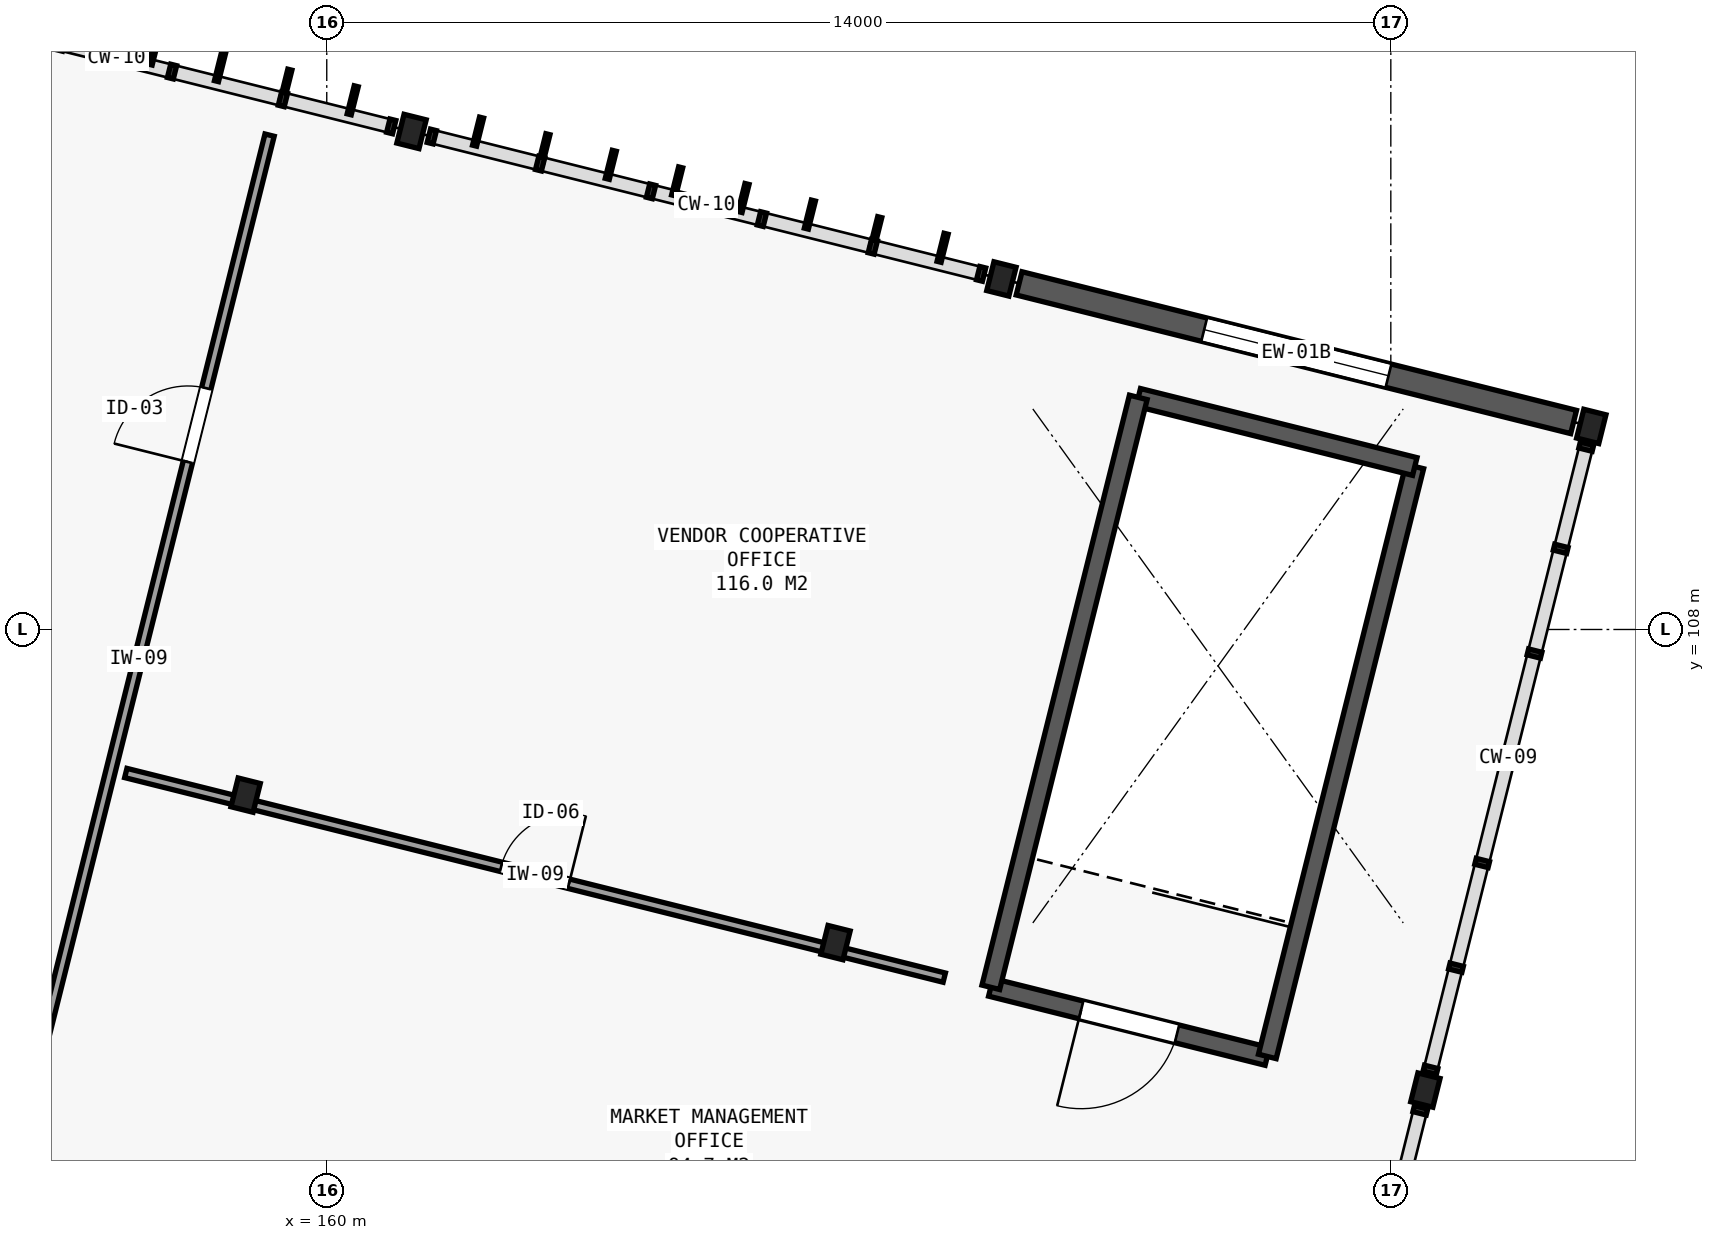
"""IFC4 building model, lengths in metres.
Left out: names, types, materials, properties, quantities, classifications, styles, units other than length and angle.
Written with IfcOpenShell. Run it as: python <this file> out.ifc"""

import sys

from ifc_helpers import new_model, si_unit, direction, frame, frame_2d, origin, origin_2d, place, context, subcontext, project, spatial, rectangle, i_section, extrude, element, fill, save


model = new_model("IFC4")
c1 = context("Model", 3, precision=1e-05, world=origin(), true_north=direction((0.0, 1.0)))
c2 = subcontext(c1, "Body", "Model", "MODEL_VIEW")
j1 = project(units=[si_unit("LENGTHUNIT", "METRE"), si_unit("PLANEANGLEUNIT", "RADIAN")], contexts=[c1])
p1 = place(None, origin())
s1 = spatial("IfcSite", under=j1, at=p1, CompositionType="ELEMENT")
p2 = place(p1, origin())
s2 = spatial("IfcBuilding", under=s1, at=p2, CompositionType="ELEMENT")
p3 = place(p2, frame((0.0, 0.0, 14.1)))
s3 = spatial("IfcBuildingStorey", under=s2, at=p3, CompositionType="ELEMENT", Elevation=14.1)
for number, where, z_axis, x_axis in (
    (1, (158.932, 105.821, 0.0), (0.0, 0.0, 1.0), (0.97, -0.243, 0.0)),
    (2, (161.115, 114.552, 0.0), (0.0, 0.0, 1.0), (0.97, -0.243, 0.0)),
    (3, (166.694, 103.881, 0.0), (0.0, 0.0, 1.0), (0.97, -0.243, 0.0)),
    (4, (168.876, 112.612, 0.0), (0.0, 0.0, 1.0), (0.97, -0.243, 0.0)),
    (5, (174.455, 101.94, 0.0), (0.0, 0.0, 1.0), (0.97, -0.243, 0.0)),
    (6, (176.638, 110.672, 0.0), (0.0, 0.0, 1.0), (0.97, -0.243, 0.0)),
):
    element("IfcColumn", number, at=place(p3, frame(where, z_axis=z_axis, x_axis=x_axis)), inside=s3, PredefinedType="COLUMN", context=c2, shape_type="SweptSolid", body=[
        extrude(i_section(OverallWidth=0.3, OverallDepth=0.39, WebThickness=0.011, FlangeThickness=0.019, FilletRadius=0.027, at=origin_2d()), origin(), (0.0, 0.0, 1.0), 4.2),
    ])
p4 = place(p3, frame((169.109, 112.554, 0.0), z_axis=(0.0, 0.0, 1.0), x_axis=(0.970138680536, -0.242550902961, 0.0)))
e7 = element("IfcWall", 7, at=p4, inside=s3, PredefinedType="SHEAR", context=c2, shape_type="SweptSolid", body=[
    extrude(rectangle(XDim=7.52, YDim=0.315, at=frame_2d((3.76, 0.0))), origin(), (0.0, 0.0, 1.0), 3.96),
])
p5 = place(p4, frame((2.51, 0.0, 1.0)))
e8 = element("IfcOpeningElement", 8, at=p5, cuts=e7, PredefinedType="OPENING", context=c2, shape_type="SweptSolid", body=[
    extrude(rectangle(XDim=2.5, YDim=1.65, at=frame_2d((1.25, 0.825))), frame((0.0, 0.167, 0.0), z_axis=(0.0, -1.0, 0.0), x_axis=(1.0, 0.0, 0.0)), (0.0, 0.0, 1.0), 0.335),
])
p6 = place(p3, frame((172.375, 102.383, 0.0), z_axis=(0.0, 0.0, 1.0), x_axis=(-0.970131009923, 0.242581581301, 0.0)))
e9 = element("IfcWall", 9, at=p6, inside=s3, PredefinedType="SOLIDWALL", context=c2, shape_type="SweptSolid", body=[
    extrude(rectangle(XDim=3.75, YDim=0.24, at=frame_2d((1.875, 0.0))), origin(), (0.0, 0.0, 1.0), 3.96),
])
p7 = place(p6, frame((1.225, 0.0, 0.0)))
e10 = element("IfcOpeningElement", 10, at=p7, cuts=e9, PredefinedType="OPENING", context=c2, shape_type="SweptSolid", body=[
    extrude(rectangle(XDim=1.3, YDim=2.15, at=frame_2d((0.65, 1.075))), frame((0.0, 0.13, 0.0), z_axis=(0.0, -1.0, 0.0), x_axis=(1.0, 0.0, 0.0)), (0.0, 0.0, 1.0), 0.26),
])
p8 = place(p3, frame((174.315, 110.144, 0.0), z_axis=(0.0, 0.0, 1.0), x_axis=(-0.242521263911, -0.970146090314, 0.0)))
e11 = element("IfcWall", 11, at=p8, inside=s3, PredefinedType="SOLIDWALL", context=c2, shape_type="SweptSolid", body=[
    extrude(rectangle(XDim=8.0, YDim=0.24, at=frame_2d((4.0, 0.0))), origin(), (0.0, 0.0, 1.0), 3.96),
])
p9 = place(p3, frame((170.677, 111.054, 0.0), z_axis=(0.0, 0.0, 1.0), x_axis=(0.970131009923, -0.242581581301, 0.0)))
e12 = element("IfcWall", 12, at=p9, inside=s3, PredefinedType="SOLIDWALL", context=c2, shape_type="SweptSolid", body=[
    extrude(rectangle(XDim=3.75, YDim=0.24, at=frame_2d((1.875, 0.0))), origin(), (0.0, 0.0, 1.0), 3.96),
])
p10 = place(p3, frame((168.737, 103.292, 0.0), z_axis=(0.0, 0.0, 1.0), x_axis=(0.242521263911, 0.970146090314, 0.0)))
e13 = element("IfcWall", 13, at=p10, inside=s3, PredefinedType="SOLIDWALL", context=c2, shape_type="SweptSolid", body=[
    extrude(rectangle(XDim=8.0, YDim=0.24, at=frame_2d((4.0, 0.0))), origin(), (0.0, 0.0, 1.0), 3.96),
])
p11 = place(p3, frame((155.804, 100.728, 0.0), z_axis=(0.0, 0.0, 1.0), x_axis=(0.242539670413, 0.970141488792, 0.0)))
e14 = element("IfcWall", 14, at=p11, inside=s3, PredefinedType="PARTITIONING", context=c2, shape_type="SweptSolid", body=[
    extrude(rectangle(XDim=14.2, YDim=0.125, at=frame_2d((7.1, 0.0))), origin(), (0.0, 0.0, 1.0), 3.61),
])
p12 = place(p11, frame((9.768, 0.0, 0.0)))
e15 = element("IfcOpeningElement", 15, at=p12, cuts=e14, PredefinedType="OPENING", context=c2, shape_type="SweptSolid", body=[
    extrude(rectangle(XDim=1.0, YDim=2.15, at=frame_2d((0.5, 1.075))), frame((0.0, 0.073, 0.0), z_axis=(0.0, -1.0, 0.0), x_axis=(1.0, 0.0, 0.0)), (0.0, 0.0, 1.0), 0.145),
])
p13 = place(p3, frame((157.356, 106.112, 0.0), z_axis=(0.0, 0.0, 1.0), x_axis=(0.970142500145, -0.242535625036, 0.0)))
e16 = element("IfcWall", 16, at=p13, inside=s3, PredefinedType="PARTITIONING", context=c2, shape_type="SweptSolid", body=[
    extrude(rectangle(XDim=11.1, YDim=0.125, at=frame_2d((5.55, 0.0))), origin(), (0.0, 0.0, 1.0), 3.61),
])
p14 = place(p13, frame((5.09, 0.0, 0.0)))
e17 = element("IfcOpeningElement", 17, at=p14, cuts=e16, PredefinedType="OPENING", context=c2, shape_type="SweptSolid", body=[
    extrude(rectangle(XDim=0.92, YDim=2.1, at=frame_2d((0.46, 1.05))), frame((0.0, 0.073, 0.0), z_axis=(0.0, -1.0, 0.0), x_axis=(1.0, 0.0, 0.0)), (0.0, 0.0, 1.0), 0.145),
])
p15 = place(p5, origin())
e18 = element("IfcWindow", 18, at=p15, inside=s3, PartitioningType="SINGLE_PANEL", PredefinedType="WINDOW", context=c2, shape_type="SweptSolid", body=[
    extrude(rectangle(XDim=2.5, YDim=1.65, at=frame_2d((1.25, 0.825))), frame((0.0, 0.03, 0.0), z_axis=(0.0, -1.0, 0.0), x_axis=(1.0, 0.0, 0.0)), (0.0, 0.0, 1.0), 0.06),
])
fill(e8, e18)
p16 = place(p7, origin())
e19 = element("IfcDoor", 19, at=p16, inside=s3, OperationType="SINGLE_SWING_RIGHT", PredefinedType="DOOR", context=c2, shape_type="SweptSolid", body=[
    extrude(rectangle(XDim=1.3, YDim=2.15, at=frame_2d((0.65, 1.075))), frame((0.0, 0.025, 0.0), z_axis=(0.0, -1.0, 0.0), x_axis=(1.0, 0.0, 0.0)), (0.0, 0.0, 1.0), 0.05),
])
fill(e10, e19)
p17 = place(p12, origin())
e20 = element("IfcDoor", 20, at=p17, inside=s3, OperationType="SINGLE_SWING_LEFT", PredefinedType="DOOR", context=c2, shape_type="SweptSolid", body=[
    extrude(rectangle(XDim=1.0, YDim=2.15, at=frame_2d((0.5, 1.075))), frame((0.0, 0.025, 0.0), z_axis=(0.0, -1.0, 0.0), x_axis=(1.0, 0.0, 0.0)), (0.0, 0.0, 1.0), 0.05),
])
fill(e15, e20)
p18 = place(p14, origin())
e21 = element("IfcDoor", 21, at=p18, inside=s3, OperationType="SINGLE_SWING_RIGHT", PredefinedType="DOOR", context=c2, shape_type="SweptSolid", body=[
    extrude(rectangle(XDim=0.92, YDim=2.1, at=frame_2d((0.46, 1.05))), frame((0.0, 0.025, 0.0), z_axis=(0.0, -1.0, 0.0), x_axis=(1.0, 0.0, 0.0)), (0.0, 0.0, 1.0), 0.05),
])
fill(e17, e21)
save(model, sys.argv[1])
